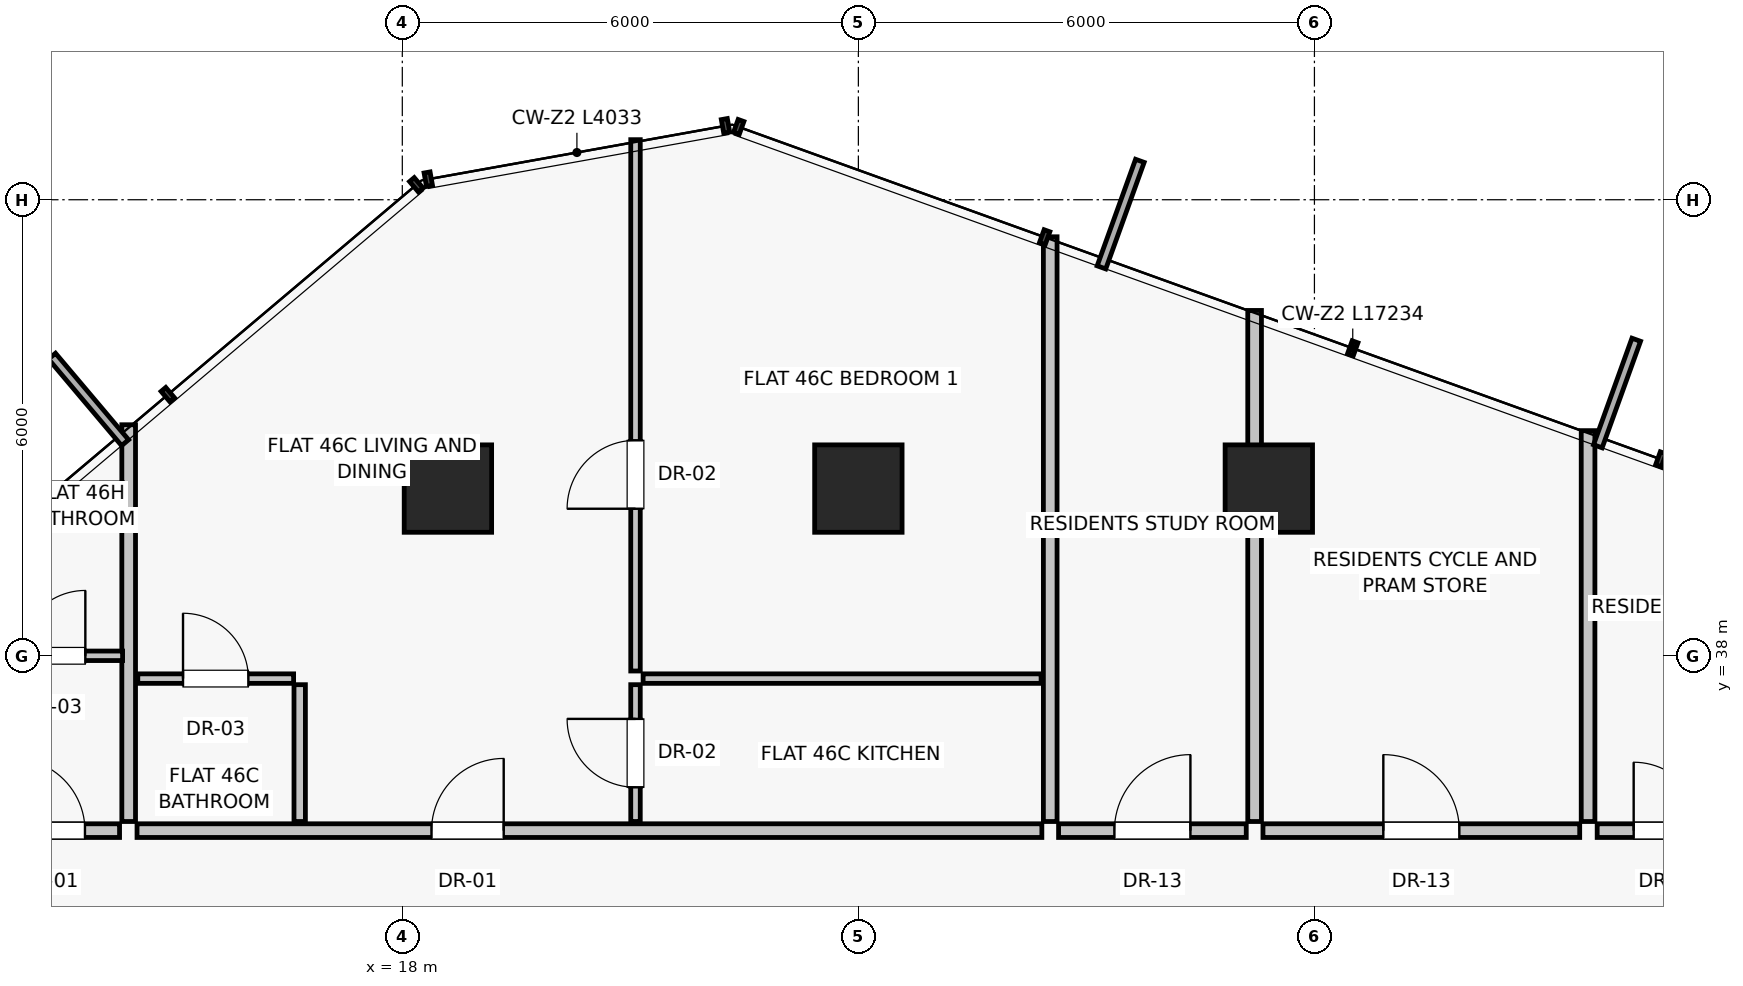
"""IFC4 building model, lengths in metres.
Left out: names, types, materials, properties, quantities, classifications, styles, units other than length and angle.
Written with IfcOpenShell. Run it as: python <this file> out.ifc"""

import sys

from ifc_helpers import new_model, si_unit, direction, frame, frame_2d, origin, origin_2d, place, context, subcontext, project, spatial, rectangle, extrude, source, transform, mapped, element, fill, save


model = new_model("IFC4")
c1 = context("Model", 3, precision=1e-05, world=origin(), true_north=direction((0.0, 1.0)))
c2 = subcontext(c1, "Body", "Model", "MODEL_VIEW")
j1 = project(units=[si_unit("LENGTHUNIT", "METRE"), si_unit("PLANEANGLEUNIT", "RADIAN")], contexts=[c1])
p1 = place(None, origin())
s1 = spatial("IfcSite", under=j1, at=p1, CompositionType="ELEMENT")
p2 = place(p1, origin())
s2 = spatial("IfcBuilding", under=s1, at=p2, CompositionType="ELEMENT")
p3 = place(p2, frame((0.0, 0.0, 163.05)))
s3 = spatial("IfcBuildingStorey", under=s2, at=p3, CompositionType="ELEMENT", Elevation=163.05)
for number, where, z_axis, x_axis in (
    (1, (29.4, 40.2, 0.0), (0.0, 0.0, 1.0), (1.0, 0.0, 0.0)),
    (2, (24.0, 40.2, 0.0), (0.0, 0.0, 1.0), (1.0, 0.0, 0.0)),
    (3, (18.6, 40.2, 0.0), (0.0, 0.0, 1.0), (1.0, 0.0, 0.0)),
):
    element("IfcColumn", number, at=place(p3, frame(where, z_axis=z_axis, x_axis=x_axis)), inside=s3, PredefinedType="COLUMN", context=c2, shape_type="SweptSolid", body=[
        extrude(rectangle(XDim=1.15, YDim=1.15, at=origin_2d()), origin(), (0.0, 0.0, 1.0), 3.25),
    ])
p4 = place(p3, frame((14.4, 35.82, 0.0), z_axis=(0.0, 0.0, 1.0), x_axis=(0.0, 1.0, 0.0)))
e4 = element("IfcWall", 4, at=p4, inside=s3, PredefinedType="PARTITIONING", context=c2, shape_type="SweptSolid", body=[
    extrude(rectangle(XDim=5.22, YDim=0.18, at=frame_2d((2.61, 0.0))), origin(), (0.0, 0.0, 1.0), 3.0),
])
p5 = place(p3, frame((33.6, 35.82, 0.0), z_axis=(0.0, 0.0, 1.0), x_axis=(0.0, 1.0, 0.0)))
e5 = element("IfcWall", 5, at=p5, inside=s3, PredefinedType="PARTITIONING", context=c2, shape_type="SweptSolid", body=[
    extrude(rectangle(XDim=5.142, YDim=0.18, at=frame_2d((2.571, 0.0))), origin(), (0.0, 0.0, 1.0), 3.0),
])
p6 = place(p3, frame((14.51, 35.7, 0.0), z_axis=(0.0, 0.0, 1.0), x_axis=(1.0, 0.0, 0.0)))
e6 = element("IfcWall", 6, at=p6, inside=s3, PredefinedType="PARTITIONING", context=c2, shape_type="SweptSolid", body=[
    extrude(rectangle(XDim=11.904, YDim=0.18, at=frame_2d((5.952, 0.0))), origin(), (0.0, 0.0, 1.0), 2.58),
])
p7 = place(p6, frame((3.874, 0.0, 0.0)))
e7 = element("IfcOpeningElement", 7, at=p7, cuts=e6, PredefinedType="OPENING", context=c2, shape_type="SweptSolid", body=[
    extrude(rectangle(XDim=0.95, YDim=2.02, at=frame_2d((0.475, 1.01))), frame((0.0, 0.1, 0.0), z_axis=(0.0, -1.0, 0.0), x_axis=(1.0, 0.0, 0.0)), (0.0, 0.0, 1.0), 0.2),
])
p8 = place(p3, frame((16.65, 35.82, 0.0), z_axis=(0.0, 0.0, 1.0), x_axis=(0.0, 1.0, 0.0)))
e8 = element("IfcWall", 8, at=p8, inside=s3, PredefinedType="PARTITIONING", context=c2, shape_type="SweptSolid", body=[
    extrude(rectangle(XDim=1.8, YDim=0.15, at=frame_2d((0.9, 0.0))), origin(), (0.0, 0.0, 1.0), 3.0),
])
p9 = place(p3, frame((14.52, 37.7, 0.0), z_axis=(0.0, 0.0, 1.0), x_axis=(1.0, 0.0, 0.0)))
e9 = element("IfcWall", 9, at=p9, inside=s3, PredefinedType="PARTITIONING", context=c2, shape_type="SweptSolid", body=[
    extrude(rectangle(XDim=2.05, YDim=0.125, at=frame_2d((1.025, 0.0))), origin(), (0.0, 0.0, 1.0), 3.0),
])
p10 = place(p9, frame((0.595, 0.0, 0.0)))
e10 = element("IfcOpeningElement", 10, at=p10, cuts=e9, PredefinedType="OPENING", context=c2, shape_type="SweptSolid", body=[
    extrude(rectangle(XDim=0.86, YDim=2.01, at=frame_2d((0.43, 1.005))), frame((0.0, 0.073, 0.0), z_axis=(0.0, -1.0, 0.0), x_axis=(1.0, 0.0, 0.0)), (0.0, 0.0, 1.0), 0.145),
])
p11 = place(p3, frame((21.068, 35.82, 0.0), z_axis=(0.0, 0.0, 1.0), x_axis=(0.0, 1.0, 0.0)))
e11 = element("IfcWall", 11, at=p11, inside=s3, PredefinedType="PARTITIONING", context=c2, shape_type="SweptSolid", body=[
    extrude(rectangle(XDim=1.8, YDim=0.125, at=frame_2d((0.9, 0.0))), origin(), (0.0, 0.0, 1.0), 3.0),
])
p12 = place(p11, frame((0.45, 0.0, 0.0)))
e12 = element("IfcOpeningElement", 12, at=p12, cuts=e11, PredefinedType="OPENING", context=c2, shape_type="SweptSolid", body=[
    extrude(rectangle(XDim=0.9, YDim=2.01, at=frame_2d((0.45, 1.005))), frame((0.0, 0.073, 0.0), z_axis=(0.0, -1.0, 0.0), x_axis=(1.0, 0.0, 0.0)), (0.0, 0.0, 1.0), 0.145),
])
p13 = place(p3, frame((21.168, 37.7, 0.0), z_axis=(0.0, 0.0, 1.0), x_axis=(1.0, 0.0, 0.0)))
e13 = element("IfcWall", 13, at=p13, inside=s3, PredefinedType="PARTITIONING", context=c2, shape_type="SweptSolid", body=[
    extrude(rectangle(XDim=5.236, YDim=0.125, at=frame_2d((2.618, 0.0))), origin(), (0.0, 0.0, 1.0), 3.0),
])
p14 = place(p3, frame((21.068, 37.8, 0.0), z_axis=(0.0, 0.0, 1.0), x_axis=(0.0, 1.0, 0.0)))
e14 = element("IfcWall", 14, at=p14, inside=s3, PredefinedType="PARTITIONING", context=c2, shape_type="SweptSolid", body=[
    extrude(rectangle(XDim=6.99, YDim=0.125, at=frame_2d((3.495, 0.0))), origin(), (0.0, 0.0, 1.0), 3.0),
])
p15 = place(p14, frame((2.135, 0.0, 0.0)))
e15 = element("IfcOpeningElement", 15, at=p15, cuts=e14, PredefinedType="OPENING", context=c2, shape_type="SweptSolid", body=[
    extrude(rectangle(XDim=0.9, YDim=2.01, at=frame_2d((0.45, 1.005))), frame((0.0, 0.073, 0.0), z_axis=(0.0, -1.0, 0.0), x_axis=(1.0, 0.0, 0.0)), (0.0, 0.0, 1.0), 0.145),
])
p16 = place(p3, frame((26.524, 35.82, 0.0), z_axis=(0.0, 0.0, 1.0), x_axis=(0.0, 1.0, 0.0)))
e16 = element("IfcWall", 16, at=p16, inside=s3, PredefinedType="PARTITIONING", context=c2, shape_type="SweptSolid", body=[
    extrude(rectangle(XDim=7.693, YDim=0.18, at=frame_2d((3.846, 0.0))), origin(), (0.0, 0.0, 1.0), 3.0),
])
p17 = place(p3, frame((26.634, 35.7, 0.0), z_axis=(0.0, 0.0, 1.0), x_axis=(1.0, 0.0, 0.0)))
e17 = element("IfcWall", 17, at=p17, inside=s3, PredefinedType="PARTITIONING", context=c2, shape_type="SweptSolid", body=[
    extrude(rectangle(XDim=2.469, YDim=0.18, at=frame_2d((1.234, 0.0))), origin(), (0.0, 0.0, 1.0), 2.58),
])
p18 = place(p17, frame((0.735, 0.0, 0.0)))
e18 = element("IfcOpeningElement", 18, at=p18, cuts=e17, PredefinedType="OPENING", context=c2, shape_type="SweptSolid", body=[
    extrude(rectangle(XDim=1.0, YDim=2.01, at=frame_2d((0.5, 1.005))), frame((0.0, 0.1, 0.0), z_axis=(0.0, -1.0, 0.0), x_axis=(1.0, 0.0, 0.0)), (0.0, 0.0, 1.0), 0.2),
])
p19 = place(p3, frame((29.323, 35.7, 0.0), z_axis=(0.0, 0.0, 1.0), x_axis=(1.0, 0.0, 0.0)))
e19 = element("IfcWall", 19, at=p19, inside=s3, PredefinedType="PARTITIONING", context=c2, shape_type="SweptSolid", body=[
    extrude(rectangle(XDim=4.167, YDim=0.18, at=frame_2d((2.083, 0.0))), origin(), (0.0, 0.0, 1.0), 2.58),
])
p20 = place(p19, frame((1.583, 0.0, 0.0)))
e20 = element("IfcOpeningElement", 20, at=p20, cuts=e19, PredefinedType="OPENING", context=c2, shape_type="SweptSolid", body=[
    extrude(rectangle(XDim=1.0, YDim=2.01, at=frame_2d((0.5, 1.005))), frame((0.0, 0.1, 0.0), z_axis=(0.0, -1.0, 0.0), x_axis=(1.0, 0.0, 0.0)), (0.0, 0.0, 1.0), 0.2),
])
p21 = place(p3, frame((29.213, 35.82, 0.0), z_axis=(0.0, 0.0, 1.0), x_axis=(0.0, 1.0, 0.0)))
e21 = element("IfcWall", 21, at=p21, inside=s3, PredefinedType="PARTITIONING", context=c2, shape_type="SweptSolid", body=[
    extrude(rectangle(XDim=6.723, YDim=0.18, at=frame_2d((3.362, 0.0))), origin(), (0.0, 0.0, 1.0), 2.378),
])
p22 = place(p3, frame((12.42, 35.7, 0.0), z_axis=(0.0, 0.0, 1.0), x_axis=(1.0, 0.0, 0.0)))
e22 = element("IfcWall", 22, at=p22, inside=s3, PredefinedType="PARTITIONING", context=c2, shape_type="SweptSolid", body=[
    extrude(rectangle(XDim=1.86, YDim=0.18, at=frame_2d((0.93, 0.0))), origin(), (0.0, 0.0, 1.0), 3.0),
])
p23 = place(p22, frame((0.455, 0.0, 0.0)))
e23 = element("IfcOpeningElement", 23, at=p23, cuts=e22, PredefinedType="OPENING", context=c2, shape_type="SweptSolid", body=[
    extrude(rectangle(XDim=0.95, YDim=2.02, at=frame_2d((0.475, 1.01))), frame((0.0, 0.1, 0.0), z_axis=(0.0, -1.0, 0.0), x_axis=(1.0, 0.0, 0.0)), (0.0, 0.0, 1.0), 0.2),
])
p24 = place(p3, frame((12.48, 38.0, 0.0), z_axis=(0.0, 0.0, 1.0), x_axis=(1.0, 0.0, 0.0)))
e24 = element("IfcWall", 24, at=p24, inside=s3, PredefinedType="PARTITIONING", context=c2, shape_type="SweptSolid", body=[
    extrude(rectangle(XDim=1.84, YDim=0.125, at=frame_2d((0.92, 0.0))), origin(), (0.0, 0.0, 1.0), 3.0),
])
p25 = place(p24, frame((0.49, 0.0, 0.0)))
e25 = element("IfcOpeningElement", 25, at=p25, cuts=e24, PredefinedType="OPENING", context=c2, shape_type="SweptSolid", body=[
    extrude(rectangle(XDim=0.86, YDim=2.01, at=frame_2d((0.43, 1.005))), frame((0.0, 0.073, 0.0), z_axis=(0.0, -1.0, 0.0), x_axis=(1.0, 0.0, 0.0)), (0.0, 0.0, 1.0), 0.145),
])
p26 = place(p3, frame((13.406, 40.2, 0.0), z_axis=(0.0, 0.0, 1.0), x_axis=(1.0, 0.0, 0.0)))
e26 = element("IfcWall", 26, at=p26, inside=s3, PredefinedType="PARTITIONING", context=c2, shape_type="SweptSolid", body=[
    extrude(rectangle(XDim=0.914, YDim=0.15, at=frame_2d((0.457, 0.0))), origin(), (0.0, 0.0, 1.0), 3.0),
])
p27 = place(p3, frame((33.72, 35.7, 0.0), z_axis=(0.0, 0.0, 1.0), x_axis=(1.0, 0.0, 0.0)))
e27 = element("IfcWall", 27, at=p27, inside=s3, PredefinedType="PARTITIONING", context=c2, shape_type="SweptSolid", body=[
    extrude(rectangle(XDim=1.86, YDim=0.18, at=frame_2d((0.93, 0.0))), origin(), (0.0, 0.0, 1.0), 3.0),
])
p28 = place(p27, frame((0.48, 0.0, 0.0)))
e28 = element("IfcOpeningElement", 28, at=p28, cuts=e27, PredefinedType="OPENING", context=c2, shape_type="SweptSolid", body=[
    extrude(rectangle(XDim=0.9, YDim=2.01, at=frame_2d((0.45, 1.005))), frame((0.0, 0.1, 0.0), z_axis=(0.0, -1.0, 0.0), x_axis=(1.0, 0.0, 0.0)), (0.0, 0.0, 1.0), 0.2),
])
m1 = source(origin(), c2, "Body", "SweptSolid", [
    extrude(rectangle(XDim=0.95, YDim=2.02, at=frame_2d((0.475, 1.01))), frame((0.0, 0.025, 0.0), z_axis=(0.0, -1.0, 0.0), x_axis=(1.0, 0.0, 0.0)), (0.0, 0.0, 1.0), 0.05),
])
p29 = place(p7, origin())
e29 = element("IfcDoor", 29, at=p29, inside=s3, OperationType="SINGLE_SWING_RIGHT", PredefinedType="DOOR", context=c2, shape_type="MappedRepresentation", body=[
    mapped(m1, transform((0.0, 0.0, 0.0), scale=1.0)),
])
fill(e7, e29)
m2 = source(origin(), c2, "Body", "SweptSolid", [
    extrude(rectangle(XDim=0.86, YDim=2.01, at=frame_2d((0.43, 1.005))), frame((0.0, 0.025, 0.0), z_axis=(0.0, -1.0, 0.0), x_axis=(1.0, 0.0, 0.0)), (0.0, 0.0, 1.0), 0.05),
])
p30 = place(p10, origin())
e30 = element("IfcDoor", 30, at=p30, inside=s3, OperationType="SINGLE_SWING_LEFT", PredefinedType="DOOR", context=c2, shape_type="MappedRepresentation", body=[
    mapped(m2, transform((0.0, 0.0, 0.0), scale=1.0)),
])
fill(e10, e30)
m3 = source(origin(), c2, "Body", "SweptSolid", [
    extrude(rectangle(XDim=0.9, YDim=2.01, at=frame_2d((0.45, 1.005))), frame((0.0, 0.025, 0.0), z_axis=(0.0, -1.0, 0.0), x_axis=(1.0, 0.0, 0.0)), (0.0, 0.0, 1.0), 0.05),
])
p31 = place(p12, origin())
e31 = element("IfcDoor", 31, at=p31, inside=s3, OperationType="SINGLE_SWING_RIGHT", PredefinedType="DOOR", context=c2, shape_type="MappedRepresentation", body=[
    mapped(m3, transform((0.0, 0.0, 0.0), scale=1.0)),
])
fill(e12, e31)
p32 = place(p15, origin())
e32 = element("IfcDoor", 32, at=p32, inside=s3, OperationType="SINGLE_SWING_LEFT", PredefinedType="DOOR", context=c2, shape_type="MappedRepresentation", body=[
    mapped(m3, transform((0.0, 0.0, 0.0), scale=1.0)),
])
fill(e15, e32)
m4 = source(origin(), c2, "Body", "SweptSolid", [
    extrude(rectangle(XDim=1.0, YDim=2.01, at=frame_2d((0.5, 1.005))), frame((0.0, 0.025, 0.0), z_axis=(0.0, -1.0, 0.0), x_axis=(1.0, 0.0, 0.0)), (0.0, 0.0, 1.0), 0.05),
])
p33 = place(p18, origin())
e33 = element("IfcDoor", 33, at=p33, inside=s3, OperationType="SINGLE_SWING_RIGHT", PredefinedType="DOOR", context=c2, shape_type="MappedRepresentation", body=[
    mapped(m4, transform((0.0, 0.0, 0.0), scale=1.0)),
])
fill(e18, e33)
p34 = place(p20, origin())
e34 = element("IfcDoor", 34, at=p34, inside=s3, OperationType="SINGLE_SWING_LEFT", PredefinedType="DOOR", context=c2, shape_type="MappedRepresentation", body=[
    mapped(m4, transform((0.0, 0.0, 0.0), scale=1.0)),
])
fill(e20, e34)
p35 = place(p23, origin())
e35 = element("IfcDoor", 35, at=p35, inside=s3, OperationType="SINGLE_SWING_LEFT", PredefinedType="DOOR", context=c2, shape_type="MappedRepresentation", body=[
    mapped(m1, transform((0.0, 0.0, 0.0), scale=1.0)),
])
fill(e23, e35)
p36 = place(p25, origin())
e36 = element("IfcDoor", 36, at=p36, inside=s3, OperationType="SINGLE_SWING_RIGHT", PredefinedType="DOOR", context=c2, shape_type="MappedRepresentation", body=[
    mapped(m2, transform((0.0, 0.0, 0.0), scale=1.0)),
])
fill(e25, e36)
p37 = place(p28, origin())
e37 = element("IfcDoor", 37, at=p37, inside=s3, OperationType="SINGLE_SWING_LEFT", PredefinedType="DOOR", context=c2, shape_type="MappedRepresentation", body=[
    mapped(m3, transform((0.0, 0.0, 0.0), scale=1.0)),
])
fill(e28, e37)
save(model, sys.argv[1])
